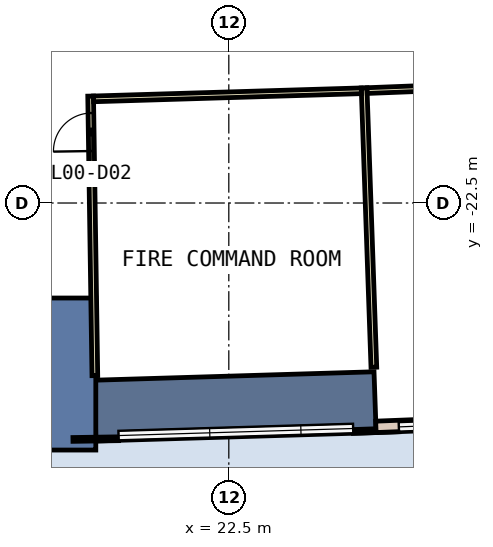
"""IFC4 building model, lengths in metres.
Left out: names, types, materials, properties, quantities, classifications, styles, units other than length and angle.
Written with IfcOpenShell. Run it as: python <this file> out.ifc"""

import sys

from ifc_helpers import new_model, si_unit, direction, frame, frame_2d, origin, place, context, subcontext, project, spatial, polyline, rectangle, outline, extrude, element, fill, save


model = new_model("IFC4")
c1 = context("Model", 3, precision=1e-05, world=origin(), true_north=direction((0.0, 1.0)))
c2 = subcontext(c1, "Body", "Model", "MODEL_VIEW")
j1 = project(units=[si_unit("LENGTHUNIT", "METRE"), si_unit("PLANEANGLEUNIT", "RADIAN")], contexts=[c1])
p1 = place(None, origin())
s1 = spatial("IfcSite", under=j1, at=p1, CompositionType="ELEMENT")
p2 = place(p1, origin())
s2 = spatial("IfcBuilding", under=s1, at=p2, CompositionType="ELEMENT")
p3 = place(p2, origin())
s3 = spatial("IfcBuildingStorey", under=s2, at=p3, CompositionType="ELEMENT", Elevation=0.0)
p4 = place(p3, frame((0.0, 0.0, -0.5)))
e1 = element("IfcWall", 1, at=p4, inside=s3, PredefinedType="SHEAR", context=c2, shape_type="SweptSolid", body=[
    extrude(outline(polyline([(19.0, -28.762), (26.377, -28.54), (26.321, -26.941), (18.976, -27.162), (19.0, -28.762)])), origin(), (0.0, 0.0, 1.0), 9.05),
])
p5 = place(p3, frame((-19.0, -25.0, 34.4), z_axis=(0.0, 1.0, 0.0), x_axis=(1.0, 0.0, 0.0)))
e2 = element("IfcWall", 2, at=p5, inside=s3, PredefinedType="SHEAR", context=c2, shape_type="SweptSolid", body=[
    extrude(outline(polyline([(0.0, 0.0), (38.0, 0.0), (38.0, 34.4), (34.0, 34.4), (34.0, 18.4), (33.062, 14.572), (32.125, 13.075), (31.188, 11.987), (30.25, 11.124), (29.312, 10.412), (28.375, 9.813), (27.438, 9.305), (26.5, 8.874), (25.562, 8.509), (24.625, 8.203), (23.688, 7.951), (22.75, 7.749), (21.812, 7.595), (20.875, 7.486), (19.938, 7.422), (19.0, 7.4), (18.062, 7.422), (17.125, 7.486), (16.188, 7.595), (15.25, 7.749), (14.312, 7.951), (13.375, 8.203), (12.438, 8.509), (11.5, 8.874), (10.562, 9.305), (9.625, 9.813), (8.688, 10.412), (7.75, 11.124), (6.812, 11.987), (5.875, 13.075), (4.938, 14.572), (4.0, 18.4), (4.0, 34.4), (0.0, 34.4), (0.0, 0.0)])), origin(), (0.0, 0.0, -1.0), 4.0),
])
p6 = place(p3, frame((18.399, -28.721, 0.0), z_axis=(0.0, 0.0, 1.0), x_axis=(0.999886724523, 0.015051183404, 0.0)))
e3 = element("IfcWall", 3, at=p6, inside=s3, PredefinedType="STANDARD", context=c2, shape_type="SweptSolid", body=[
    extrude(rectangle(XDim=1.2, YDim=0.1, at=frame_2d((0.6, 0.0))), origin(), (0.0, 0.0, 1.0), 8.55),
])
p7 = place(p3, frame((25.776, -28.511, 0.0), z_axis=(0.0, 0.0, 1.0), x_axis=(0.999387493042, 0.034994838926, 0.0)))
e4 = element("IfcWall", 4, at=p7, inside=s3, PredefinedType="STANDARD", context=c2, shape_type="SweptSolid", body=[
    extrude(rectangle(XDim=1.2, YDim=0.1, at=frame_2d((0.6, 0.0))), origin(), (0.0, 0.0, 1.0), 8.55),
])
p8 = place(p3, frame((32.906, -28.134, 0.0), z_axis=(0.0, 0.0, 1.0), x_axis=(-0.999234642094, -0.039116876654, 0.0)))
e5 = element("IfcWall", 5, at=p8, inside=s3, PredefinedType="STANDARD", context=c2, shape_type="SweptSolid", body=[
    extrude(rectangle(XDim=6.541, YDim=0.3, at=frame_2d((3.271, 0.0))), origin(), (0.0, 0.0, 1.0), 3.0),
])
p9 = place(p8, frame((2.371, 0.0, 0.0)))
e6 = element("IfcOpeningElement", 6, at=p9, cuts=e5, PredefinedType="OPENING", context=c2, shape_type="SweptSolid", body=[
    extrude(rectangle(XDim=1.8, YDim=2.4, at=frame_2d((0.9, 1.2))), frame((0.0, 0.16, 0.0), z_axis=(0.0, -1.0, 0.0), x_axis=(1.0, 0.0, 0.0)), (0.0, 0.0, 1.0), 0.32),
])
p10 = place(p3, frame((26.06, -19.47, 0.0), z_axis=(0.0, 0.0, 1.0), x_axis=(0.034912620967, -0.999390368623, 0.0)))
e7 = element("IfcWall", 7, at=p10, inside=s3, PredefinedType="PARTITIONING", context=c2, shape_type="SweptSolid", body=[
    extrude(rectangle(XDim=7.356, YDim=0.15, at=frame_2d((3.678, 0.0))), origin(), (0.0, 0.0, 1.0), 8.55),
])
p11 = place(p3, frame((18.975, -27.042, 0.0), z_axis=(0.0, 0.0, 1.0), x_axis=(-0.015101510801, 0.999885965684, 0.0)))
e8 = element("IfcWall", 8, at=p11, inside=s3, PredefinedType="PARTITIONING", context=c2, shape_type="SweptSolid", body=[
    extrude(rectangle(XDim=7.356, YDim=0.15, at=frame_2d((3.678, 0.0))), origin(), (0.0, 0.0, 1.0), 8.55),
])
p12 = place(p11, frame((5.91, 0.0, 0.0)))
e9 = element("IfcOpeningElement", 9, at=p12, cuts=e8, PredefinedType="OPENING", context=c2, shape_type="SweptSolid", body=[
    extrude(rectangle(XDim=1.0, YDim=2.1, at=frame_2d((0.5, 1.05))), frame((0.0, 0.085, 0.0), z_axis=(0.0, -1.0, 0.0), x_axis=(1.0, 0.0, 0.0)), (0.0, 0.0, 1.0), 0.17),
])
p13 = place(p3, frame((18.94, -19.76, 0.0), z_axis=(0.0, 0.0, 1.0), x_axis=(0.999544128502, 0.030191640862, 0.0)))
e10 = element("IfcWall", 10, at=p13, inside=s3, PredefinedType="PARTITIONING", context=c2, shape_type="SweptSolid", body=[
    extrude(rectangle(XDim=7.051, YDim=0.15, at=frame_2d((3.526, 0.0))), origin(), (0.0, 0.0, 1.0), 8.55),
])
p14 = place(p3, frame((26.14, -19.542, 0.0), z_axis=(0.0, 0.0, 1.0), x_axis=(0.99924214326, 0.038924788152, 0.0)))
e11 = element("IfcWall", 11, at=p14, inside=s3, PredefinedType="PARTITIONING", context=c2, shape_type="SweptSolid", body=[
    extrude(rectangle(XDim=5.187, YDim=0.15, at=frame_2d((2.594, 0.0))), origin(), (0.0, 0.0, 1.0), 8.55),
])
p15 = place(p12, origin())
e12 = element("IfcDoor", 12, at=p15, inside=s3, OperationType="SINGLE_SWING_LEFT", PredefinedType="DOOR", context=c2, shape_type="SweptSolid", body=[
    extrude(rectangle(XDim=1.0, YDim=2.1, at=frame_2d((0.5, 1.05))), frame((0.0, 0.025, 0.0), z_axis=(0.0, -1.0, 0.0), x_axis=(1.0, 0.0, 0.0)), (0.0, 0.0, 1.0), 0.05),
])
fill(e9, e12)
save(model, sys.argv[1])
